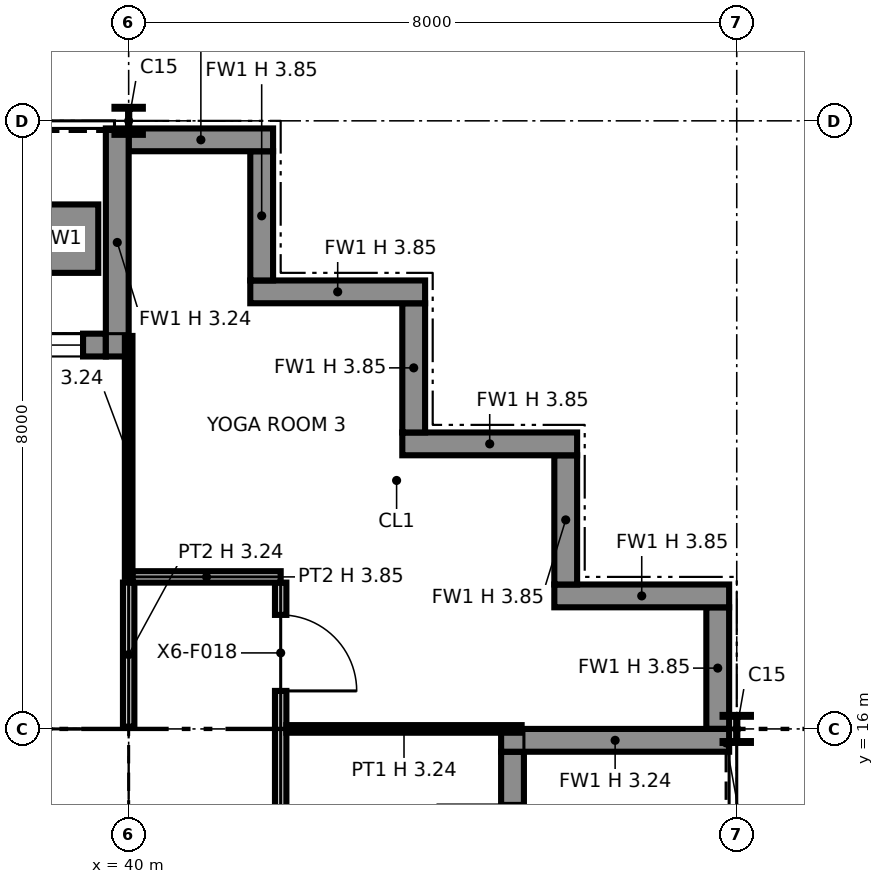
"""IFC4 building model, lengths in metres.
Left out: names, types, materials, properties, quantities, classifications, styles, units other than length and angle.
Written with IfcOpenShell. Run it as: python <this file> out.ifc"""

import sys

from ifc_helpers import new_model, si_unit, direction, frame, frame_2d, origin, origin_2d, place, context, subcontext, project, spatial, polyline, rectangle, i_section, outline, extrude, element, fill, save


model = new_model("IFC4")
c1 = context("Model", 3, precision=1e-05, world=origin(), true_north=direction((0.0, 1.0)))
c2 = subcontext(c1, "Body", "Model", "MODEL_VIEW")
j1 = project(units=[si_unit("LENGTHUNIT", "METRE"), si_unit("PLANEANGLEUNIT", "RADIAN")], contexts=[c1])
p1 = place(None, origin())
s1 = spatial("IfcSite", under=j1, at=p1, CompositionType="ELEMENT")
p2 = place(p1, origin())
s2 = spatial("IfcBuilding", under=s1, at=p2, CompositionType="ELEMENT")
p3 = place(p2, frame((0.0, 0.0, 291.0)))
s3 = spatial("IfcBuildingStorey", under=s2, at=p3, CompositionType="ELEMENT", Elevation=291.0)
p4 = place(p3, frame((40.0, 16.0, 0.0), z_axis=(0.0, 0.0, 1.0), x_axis=(1.0, 0.0, 0.0)))
e1 = element("IfcColumn", 1, at=p4, inside=s3, PredefinedType="COLUMN", context=c2, shape_type="SweptSolid", body=[
    extrude(i_section(OverallWidth=0.257, OverallDepth=0.363, WebThickness=0.013, FlangeThickness=0.022, at=origin_2d()), origin(), (0.0, 0.0, 1.0), 3.85),
])
for number, where, z_axis, x_axis in (
    (2, (40.0, 24.0, 0.0), (0.0, 0.0, 1.0), (1.0, 0.0, 0.0)),
    (3, (48.0, 16.0, 0.0), (0.0, 0.0, 1.0), (1.0, 0.0, 0.0)),
):
    element("IfcColumn", number, at=place(p3, frame(where, z_axis=z_axis, x_axis=x_axis)), inside=s3, PredefinedType="COLUMN", context=c2, shape_type="SweptSolid", body=[
        extrude(i_section(OverallWidth=0.373, OverallDepth=0.368, WebThickness=0.015, FlangeThickness=0.024, at=origin_2d()), origin(), (0.0, 0.0, 1.0), 3.85),
    ])
p5 = place(p3, frame((45.05, 8.3, 0.0), z_axis=(0.0, 0.0, 1.0), x_axis=(0.0, 1.0, 0.0)))
e4 = element("IfcWall", 4, at=p5, inside=s3, PredefinedType="SOLIDWALL", context=c2, shape_type="SweptSolid", body=[
    extrude(rectangle(XDim=7.4, YDim=0.3, at=frame_2d((3.7, 0.0))), origin(), (0.0, 0.0, 1.0), 3.85),
])
p6 = place(p5, frame((0.3, 0.0, 0.9)))
e5 = element("IfcOpeningElement", 5, at=p6, cuts=e4, PredefinedType="OPENING", context=c2, shape_type="SweptSolid", body=[
    extrude(rectangle(XDim=2.8, YDim=2.2, at=frame_2d((1.4, 1.1))), frame((0.0, 0.16, 0.0), z_axis=(0.0, -1.0, 0.0), x_axis=(1.0, 0.0, 0.0)), (0.0, 0.0, 1.0), 0.32),
])
p7 = place(p5, frame((4.7, 0.0, 0.0)))
e6 = element("IfcOpeningElement", 6, at=p7, cuts=e4, PredefinedType="OPENING", context=c2, shape_type="SweptSolid", body=[
    extrude(rectangle(XDim=2.0, YDim=2.4, at=frame_2d((1.0, 1.2))), frame((0.0, 0.16, 0.0), z_axis=(0.0, -1.0, 0.0), x_axis=(1.0, 0.0, 0.0)), (0.0, 0.0, 1.0), 0.32),
])
p8 = place(p3, frame((47.9, 15.85, 0.0), z_axis=(0.0, 0.0, 1.0), x_axis=(-1.0, 0.0, 0.0)))
e7 = element("IfcWall", 7, at=p8, inside=s3, PredefinedType="SOLIDWALL", context=c2, shape_type="SweptSolid", body=[
    extrude(rectangle(XDim=3.0, YDim=0.3, at=frame_2d((1.5, 0.0))), origin(), (0.0, 0.0, 1.0), 3.237),
])
p9 = place(p3, frame((47.75, 16.0, 0.0), z_axis=(0.0, 0.0, 1.0), x_axis=(0.0, 1.0, 0.0)))
e8 = element("IfcWall", 8, at=p9, inside=s3, PredefinedType="SOLIDWALL", context=c2, shape_type="SweptSolid", body=[
    extrude(rectangle(XDim=1.6, YDim=0.3, at=frame_2d((0.8, 0.0))), origin(), (0.0, 0.0, 1.0), 3.85),
])
p10 = place(p3, frame((47.9, 17.75, 0.0), z_axis=(0.0, 0.0, 1.0), x_axis=(-1.0, 0.0, 0.0)))
e9 = element("IfcWall", 9, at=p10, inside=s3, PredefinedType="SOLIDWALL", context=c2, shape_type="SweptSolid", body=[
    extrude(rectangle(XDim=2.3, YDim=0.3, at=frame_2d((1.15, 0.0))), origin(), (0.0, 0.0, 1.0), 3.85),
])
p11 = place(p3, frame((45.75, 17.9, 0.0), z_axis=(0.0, 0.0, 1.0), x_axis=(0.0, 1.0, 0.0)))
e10 = element("IfcWall", 10, at=p11, inside=s3, PredefinedType="SOLIDWALL", context=c2, shape_type="SweptSolid", body=[
    extrude(rectangle(XDim=1.7, YDim=0.3, at=frame_2d((0.85, 0.0))), origin(), (0.0, 0.0, 1.0), 3.85),
])
p12 = place(p3, frame((45.9, 19.75, 0.0), z_axis=(0.0, 0.0, 1.0), x_axis=(-1.0, 0.0, 0.0)))
e11 = element("IfcWall", 11, at=p12, inside=s3, PredefinedType="SOLIDWALL", context=c2, shape_type="SweptSolid", body=[
    extrude(rectangle(XDim=2.3, YDim=0.3, at=frame_2d((1.15, 0.0))), origin(), (0.0, 0.0, 1.0), 3.85),
])
p13 = place(p3, frame((43.75, 19.9, 0.0), z_axis=(0.0, 0.0, 1.0), x_axis=(0.0, 1.0, 0.0)))
e12 = element("IfcWall", 12, at=p13, inside=s3, PredefinedType="SOLIDWALL", context=c2, shape_type="SweptSolid", body=[
    extrude(rectangle(XDim=1.7, YDim=0.3, at=frame_2d((0.85, 0.0))), origin(), (0.0, 0.0, 1.0), 3.85),
])
p14 = place(p3, frame((43.9, 21.75, 0.0), z_axis=(0.0, 0.0, 1.0), x_axis=(-1.0, 0.0, 0.0)))
e13 = element("IfcWall", 13, at=p14, inside=s3, PredefinedType="SOLIDWALL", context=c2, shape_type="SweptSolid", body=[
    extrude(rectangle(XDim=2.3, YDim=0.3, at=frame_2d((1.15, 0.0))), origin(), (0.0, 0.0, 1.0), 3.85),
])
p15 = place(p3, frame((41.75, 21.9, 0.0), z_axis=(0.0, 0.0, 1.0), x_axis=(0.0, 1.0, 0.0)))
e14 = element("IfcWall", 14, at=p15, inside=s3, PredefinedType="SOLIDWALL", context=c2, shape_type="SweptSolid", body=[
    extrude(rectangle(XDim=1.7, YDim=0.3, at=frame_2d((0.85, 0.0))), origin(), (0.0, 0.0, 1.0), 3.85),
])
p16 = place(p3, frame((41.9, 23.75, 0.0), z_axis=(0.0, 0.0, 1.0), x_axis=(-1.0, 0.0, 0.0)))
e15 = element("IfcWall", 15, at=p16, inside=s3, PredefinedType="SOLIDWALL", context=c2, shape_type="SweptSolid", body=[
    extrude(rectangle(XDim=1.9, YDim=0.3, at=frame_2d((0.95, 0.0))), origin(), (0.0, 0.0, 1.0), 3.85),
])
p17 = place(p3, frame((39.7, 21.05, 0.0), z_axis=(0.0, 0.0, 1.0), x_axis=(-1.0, 0.0, 0.0)))
e16 = element("IfcWall", 16, at=p17, inside=s3, PredefinedType="SOLIDWALL", context=c2, shape_type="SweptSolid", body=[
    extrude(rectangle(XDim=7.4, YDim=0.3, at=frame_2d((3.7, 0.0))), origin(), (0.0, 0.0, 1.0), 3.85),
])
p18 = place(p17, frame((0.3, 0.0, 0.9)))
e17 = element("IfcOpeningElement", 17, at=p18, cuts=e16, PredefinedType="OPENING", context=c2, shape_type="SweptSolid", body=[
    extrude(rectangle(XDim=2.8, YDim=2.2, at=frame_2d((1.4, 1.1))), frame((0.0, 0.16, 0.0), z_axis=(0.0, -1.0, 0.0), x_axis=(1.0, 0.0, 0.0)), (0.0, 0.0, 1.0), 0.32),
])
p19 = place(p17, frame((4.7, 0.0, 0.0)))
e18 = element("IfcOpeningElement", 18, at=p19, cuts=e16, PredefinedType="OPENING", context=c2, shape_type="SweptSolid", body=[
    extrude(rectangle(XDim=2.0, YDim=2.4, at=frame_2d((1.0, 1.2))), frame((0.0, 0.16, 0.0), z_axis=(0.0, -1.0, 0.0), x_axis=(1.0, 0.0, 0.0)), (0.0, 0.0, 1.0), 0.32),
])
p20 = place(p3, frame((39.85, 23.9, 0.0), z_axis=(0.0, 0.0, 1.0), x_axis=(0.0, -1.0, 0.0)))
e19 = element("IfcWall", 19, at=p20, inside=s3, PredefinedType="SOLIDWALL", context=c2, shape_type="SweptSolid", body=[
    extrude(rectangle(XDim=3.0, YDim=0.3, at=frame_2d((1.5, 0.0))), origin(), (0.0, 0.0, 1.0), 3.237),
])
p21 = place(p3, frame((39.6, 22.45, 0.0), z_axis=(0.0, 0.0, 1.0), x_axis=(-1.0, 0.0, 0.0)))
e20 = element("IfcWall", 20, at=p21, inside=s3, PredefinedType="SOLIDWALL", context=c2, shape_type="SweptSolid", body=[
    extrude(rectangle(XDim=3.2, YDim=0.9, at=frame_2d((1.6, 0.0))), origin(), (0.0, 0.0, 1.0), 0.6),
])
p22 = place(p3, frame((24.65, 15.25, 0.0), z_axis=(0.0, 0.0, 1.0), x_axis=(1.0, 0.0, 0.0)))
e21 = element("IfcWall", 21, at=p22, inside=s3, PredefinedType="PARTITIONING", context=c2, shape_type="SweptSolid", body=[
    extrude(outline(polyline([(0.0, 0.0), (14.7, 0.0), (14.7, 3.85), (7.438, 3.85), (7.437, 3.318), (7.263, 3.318), (7.262, 3.85), (0.0, 3.85), (0.0, 0.0)])), frame((0.0, 0.1, 0.0), z_axis=(0.0, -1.0, 0.0), x_axis=(1.0, 0.0, 0.0)), (0.0, 0.0, 1.0), 0.2),
])
p23 = place(p22, frame((2.85, 0.0, 0.0)))
e22 = element("IfcOpeningElement", 22, at=p23, cuts=e21, PredefinedType="OPENING", context=c2, shape_type="SweptSolid", body=[
    extrude(rectangle(XDim=1.8, YDim=2.1, at=frame_2d((0.9, 1.05))), frame((0.0, 0.11, 0.0), z_axis=(0.0, -1.0, 0.0), x_axis=(1.0, 0.0, 0.0)), (0.0, 0.0, 1.0), 0.22),
])
p24 = place(p22, frame((9.95, 0.0, 0.0), z_axis=(0.0, 0.0, 1.0), x_axis=(-1.0, 0.0, 0.0)))
e23 = element("IfcOpeningElement", 23, at=p24, cuts=e21, PredefinedType="OPENING", context=c2, shape_type="SweptSolid", body=[
    extrude(rectangle(XDim=1.4, YDim=2.1, at=frame_2d((0.7, 1.05))), frame((0.0, 0.11, 0.0), z_axis=(0.0, -1.0, 0.0), x_axis=(1.0, 0.0, 0.0)), (0.0, 0.0, 1.0), 0.22),
])
p25 = place(p22, frame((13.4, 0.0, 0.0), z_axis=(0.0, 0.0, 1.0), x_axis=(-1.0, 0.0, 0.0)))
e24 = element("IfcOpeningElement", 24, at=p25, cuts=e21, PredefinedType="OPENING", context=c2, shape_type="SweptSolid", body=[
    extrude(rectangle(XDim=1.4, YDim=2.1, at=frame_2d((0.7, 1.05))), frame((0.0, 0.11, 0.0), z_axis=(0.0, -1.0, 0.0), x_axis=(1.0, 0.0, 0.0)), (0.0, 0.0, 1.0), 0.22),
])
p26 = place(p3, frame((39.25, 8.85, 0.0), z_axis=(0.0, 0.0, 1.0), x_axis=(0.0, 1.0, 0.0)))
e25 = element("IfcWall", 25, at=p26, inside=s3, PredefinedType="PARTITIONING", context=c2, shape_type="SweptSolid", body=[
    extrude(rectangle(XDim=6.3, YDim=0.2, at=frame_2d((3.15, 0.0))), origin(), (0.0, 0.0, 1.0), 3.85),
])
p27 = place(p3, frame((42.0, 6.0, 0.0), z_axis=(0.0, 0.0, 1.0), x_axis=(0.0, 1.0, 0.0)))
e26 = element("IfcWall", 26, at=p27, inside=s3, PredefinedType="PARTITIONING", context=c2, shape_type="SweptSolid", body=[
    extrude(outline(polyline([(0.0, 0.0), (11.925, 0.0), (11.925, 3.85), (10.3, 3.85), (10.298, 3.238), (9.702, 3.238), (9.7, 3.85), (6.3, 3.85), (6.298, 3.238), (5.702, 3.238), (5.7, 3.85), (2.3, 3.85), (2.298, 3.238), (1.702, 3.238), (1.7, 3.85), (0.0, 3.85), (0.0, 0.0)])), frame((0.0, 0.075, 0.0), z_axis=(0.0, -1.0, 0.0), x_axis=(1.0, 0.0, 0.0)), (0.0, 0.0, 1.0), 0.15),
])
p28 = place(p27, frame((6.5, 0.0, 0.0), z_axis=(0.0, 0.0, 1.0), x_axis=(-1.0, 0.0, 0.0)))
e27 = element("IfcOpeningElement", 27, at=p28, cuts=e26, PredefinedType="OPENING", context=c2, shape_type="SweptSolid", body=[
    extrude(rectangle(XDim=1.0, YDim=2.1, at=frame_2d((0.5, 1.05))), frame((0.0, 0.085, 0.0), z_axis=(0.0, -1.0, 0.0), x_axis=(1.0, 0.0, 0.0)), (0.0, 0.0, 1.0), 0.17),
])
p29 = place(p27, frame((11.5, 0.0, 0.0), z_axis=(0.0, 0.0, 1.0), x_axis=(-1.0, 0.0, 0.0)))
e28 = element("IfcOpeningElement", 28, at=p29, cuts=e26, PredefinedType="OPENING", context=c2, shape_type="SweptSolid", body=[
    extrude(rectangle(XDim=1.0, YDim=2.1, at=frame_2d((0.5, 1.05))), frame((0.0, 0.085, 0.0), z_axis=(0.0, -1.0, 0.0), x_axis=(1.0, 0.0, 0.0)), (0.0, 0.0, 1.0), 0.17),
])
p30 = place(p3, frame((42.075, 16.0, 0.0), z_axis=(0.0, 0.0, 1.0), x_axis=(1.0, 0.0, 0.0)))
e29 = element("IfcWall", 29, at=p30, inside=s3, PredefinedType="PARTITIONING", context=c2, shape_type="SweptSolid", body=[
    extrude(rectangle(XDim=3.095, YDim=0.1, at=frame_2d((1.547, 0.0))), origin(), (0.0, 0.0, 1.0), 3.238),
])
p31 = place(p3, frame((40.0, 16.03, 0.0), z_axis=(0.0, 0.0, 1.0), x_axis=(0.0, 1.0, 0.0)))
e30 = element("IfcWall", 30, at=p31, inside=s3, PredefinedType="PARTITIONING", context=c2, shape_type="SweptSolid", body=[
    extrude(rectangle(XDim=1.895, YDim=0.15, at=frame_2d((0.948, 0.0))), origin(), (0.0, 0.0, 1.0), 3.238),
])
p32 = place(p3, frame((40.05, 18.0, 0.0), z_axis=(0.0, 0.0, 1.0), x_axis=(1.0, 0.0, 0.0)))
e31 = element("IfcWall", 31, at=p32, inside=s3, PredefinedType="PARTITIONING", context=c2, shape_type="SweptSolid", body=[
    extrude(rectangle(XDim=1.95, YDim=0.15, at=frame_2d((0.975, 0.0))), origin(), (0.0, 0.0, 1.0), 3.85),
])
p33 = place(p3, frame((40.0, 18.0, 0.0), z_axis=(0.0, 0.0, 1.0), x_axis=(0.0, 1.0, 0.0)))
e32 = element("IfcWall", 32, at=p33, inside=s3, PredefinedType="PARTITIONING", context=c2, shape_type="SweptSolid", body=[
    extrude(rectangle(XDim=3.17, YDim=0.1, at=frame_2d((1.585, 0.0))), origin(), (0.0, 0.0, 1.0), 3.238),
])
p34 = place(p18, origin())
e33 = element("IfcWindow", 33, at=p34, inside=s3, PartitioningType="SINGLE_PANEL", PredefinedType="WINDOW", context=c2, shape_type="SweptSolid", body=[
    extrude(rectangle(XDim=2.8, YDim=2.2, at=frame_2d((1.4, 1.1))), frame((0.0, 0.03, 0.0), z_axis=(0.0, -1.0, 0.0), x_axis=(1.0, 0.0, 0.0)), (0.0, 0.0, 1.0), 0.06),
])
fill(e17, e33)
p35 = place(p29, origin())
e34 = element("IfcDoor", 34, at=p35, inside=s3, OperationType="SINGLE_SWING_RIGHT", PredefinedType="DOOR", context=c2, shape_type="SweptSolid", body=[
    extrude(rectangle(XDim=1.0, YDim=2.1, at=frame_2d((0.5, 1.05))), frame((0.0, 0.025, 0.0), z_axis=(0.0, -1.0, 0.0), x_axis=(1.0, 0.0, 0.0)), (0.0, 0.0, 1.0), 0.05),
])
fill(e28, e34)
save(model, sys.argv[1])
